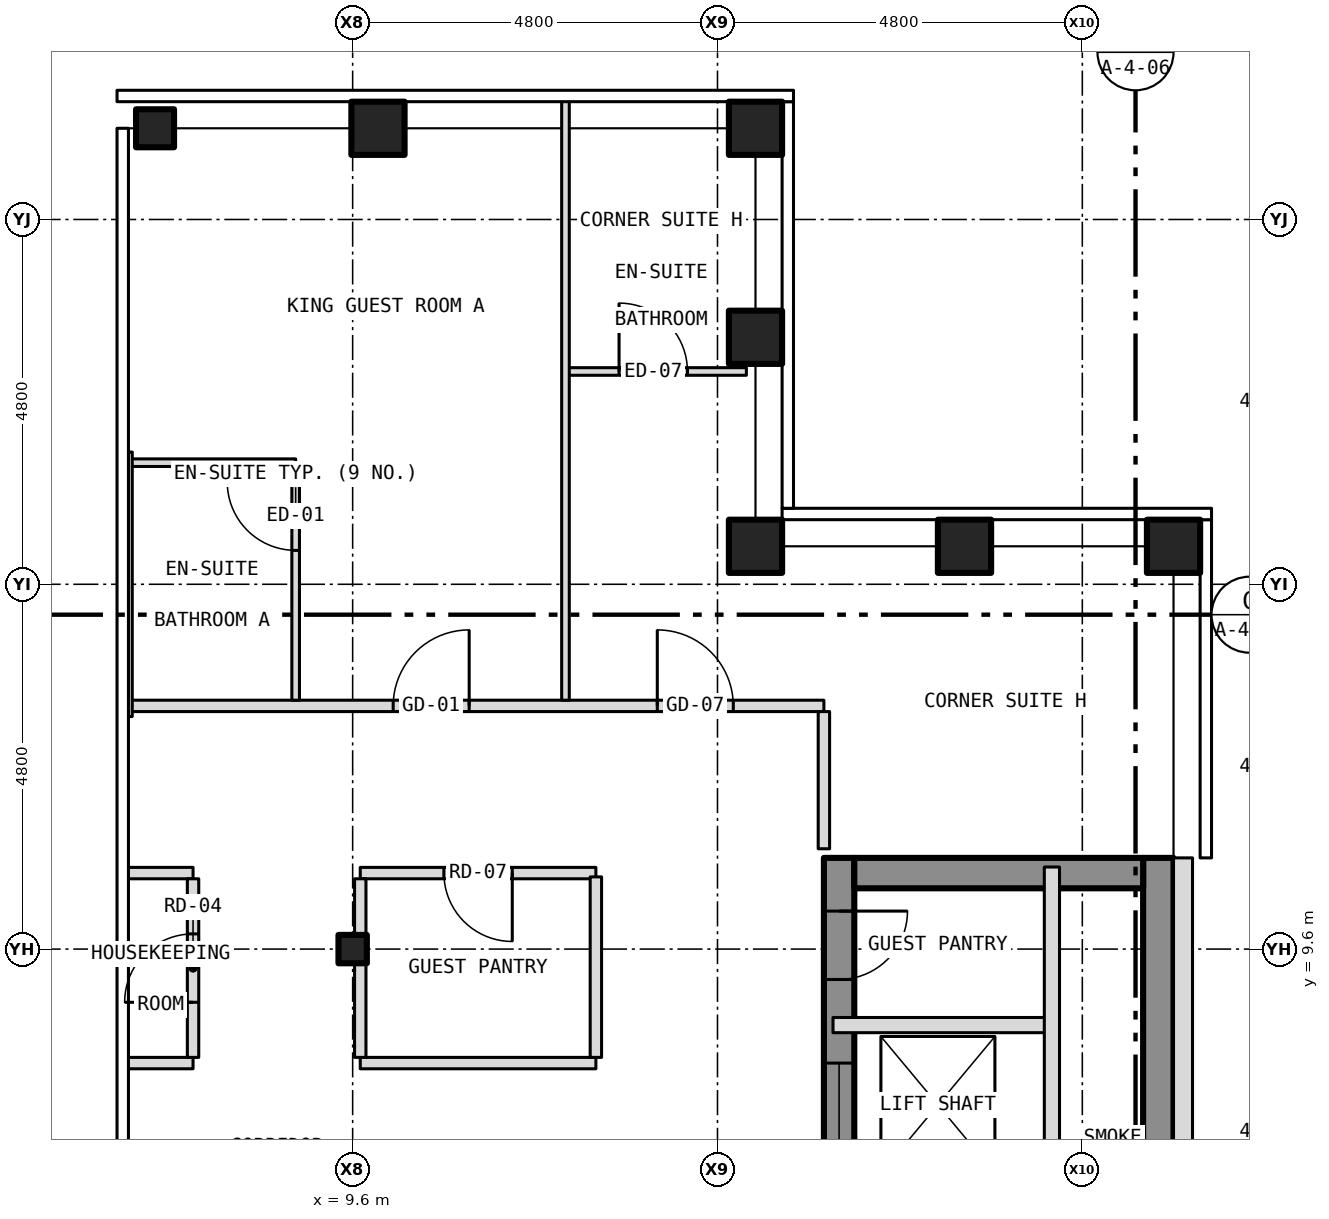
"""IFC4 building model, lengths in metres.
Left out: names, types, materials, properties, quantities, classifications, styles, units other than length and angle.
Written with IfcOpenShell. Run it as: python <this file> out.ifc"""

import sys

from ifc_helpers import new_model, si_unit, direction, frame, frame_2d, origin, origin_2d, place, context, subcontext, project, spatial, rectangle, hollow_rectangle, i_section, extrude, element, fill, save


model = new_model("IFC4")
c1 = context("Model", 3, precision=1e-05, world=origin(), true_north=direction((0.0, 1.0)))
c2 = subcontext(c1, "Body", "Model", "MODEL_VIEW")
j1 = project(units=[si_unit("LENGTHUNIT", "METRE"), si_unit("PLANEANGLEUNIT", "RADIAN")], contexts=[c1])
p1 = place(None, origin())
s1 = spatial("IfcSite", under=j1, at=p1, CompositionType="ELEMENT")
p2 = place(p1, origin())
s2 = spatial("IfcBuilding", under=s1, at=p2, CompositionType="ELEMENT")
p3 = place(p2, frame((0.0, 0.0, 229.5)))
s3 = spatial("IfcBuildingStorey", under=s2, at=p3, CompositionType="ELEMENT", Elevation=229.5)
for number, where, z_axis, x_axis in (
    (1, (9.933, 20.4, -0.15), (0.0, 0.0, 1.0), (1.0, 0.0, 0.0)),
    (2, (14.9, 20.4, -0.15), (0.0, 0.0, 1.0), (1.0, 0.0, 0.0)),
    (3, (20.4, 14.9, -0.15), (0.0, 0.0, 1.0), (1.0, 0.0, 0.0)),
    (4, (14.9, 14.9, -0.15), (0.0, 0.0, 1.0), (1.0, 0.0, 0.0)),
    (5, (14.9, 17.65, -0.15), (0.0, 0.0, 1.0), (1.0, 0.0, 0.0)),
    (6, (17.65, 14.9, -0.15), (0.0, 0.0, 1.0), (1.0, 0.0, 0.0)),
):
    element("IfcColumn", number, at=place(p3, frame(where, z_axis=z_axis, x_axis=x_axis)), inside=s3, PredefinedType="COLUMN", context=c2, shape_type="SweptSolid", body=[
        extrude(hollow_rectangle(XDim=0.7, YDim=0.7, WallThickness=0.04, at=origin_2d()), origin(), (0.0, 0.0, 1.0), 3.5),
    ])
p4 = place(p3, frame((7.0, 20.4, -0.15), z_axis=(0.0, 0.0, 1.0), x_axis=(1.0, 0.0, 0.0)))
e7 = element("IfcColumn", 7, at=p4, inside=s3, PredefinedType="COLUMN", context=c2, shape_type="SweptSolid", body=[
    extrude(hollow_rectangle(XDim=0.5, YDim=0.5, WallThickness=0.03, at=origin_2d()), origin(), (0.0, 0.0, 1.0), 3.5),
])
p5 = place(p3, frame((9.6, 9.6, -0.15), z_axis=(0.0, 0.0, 1.0), x_axis=(1.0, 0.0, 0.0)))
e8 = element("IfcColumn", 8, at=p5, inside=s3, PredefinedType="COLUMN", context=c2, shape_type="SweptSolid", body=[
    extrude(i_section(OverallWidth=0.373, OverallDepth=0.373, WebThickness=0.016, FlangeThickness=0.026, at=origin_2d()), origin(), (0.0, 0.0, 1.0), 3.5),
])
p6 = place(p3, frame((16.0, -10.8, 0.0), z_axis=(0.0, 0.0, 1.0), x_axis=(0.0, 1.0, 0.0)))
e9 = element("IfcWall", 9, at=p6, inside=s3, PredefinedType="SHEAR", context=c2, shape_type="SweptSolid", body=[
    extrude(rectangle(XDim=21.6, YDim=0.4, at=frame_2d((10.8, 0.0))), origin(), (0.0, 0.0, 1.0), 3.25),
])
p7 = place(p6, frame((9.4, 0.0, 0.0)))
e10 = element("IfcOpeningElement", 10, at=p7, cuts=e9, PredefinedType="OPENING", context=c2, shape_type="SweptSolid", body=[
    extrude(rectangle(XDim=1.1, YDim=2.1, at=frame_2d((0.55, 1.05))), frame((0.0, 0.212, 0.0), z_axis=(0.0, -1.0, 0.0), x_axis=(1.0, 0.0, 0.0)), (0.0, 0.0, 1.0), 0.424),
])
p8 = place(p6, frame((11.5, 0.0, 0.0)))
e11 = element("IfcOpeningElement", 11, at=p8, cuts=e9, PredefinedType="OPENING", context=c2, shape_type="SweptSolid", body=[
    extrude(rectangle(XDim=1.1, YDim=2.1, at=frame_2d((0.55, 1.05))), frame((0.0, 0.212, 0.0), z_axis=(0.0, -1.0, 0.0), x_axis=(1.0, 0.0, 0.0)), (0.0, 0.0, 1.0), 0.424),
])
p9 = place(p6, frame((13.6, 0.0, 0.0)))
e12 = element("IfcOpeningElement", 12, at=p9, cuts=e9, PredefinedType="OPENING", context=c2, shape_type="SweptSolid", body=[
    extrude(rectangle(XDim=1.1, YDim=2.1, at=frame_2d((0.55, 1.05))), frame((0.0, 0.212, 0.0), z_axis=(0.0, -1.0, 0.0), x_axis=(1.0, 0.0, 0.0)), (0.0, 0.0, 1.0), 0.424),
])
p10 = place(p6, frame((15.7, 0.0, 0.0)))
e13 = element("IfcOpeningElement", 13, at=p10, cuts=e9, PredefinedType="OPENING", context=c2, shape_type="SweptSolid", body=[
    extrude(rectangle(XDim=1.1, YDim=2.1, at=frame_2d((0.55, 1.05))), frame((0.0, 0.212, 0.0), z_axis=(0.0, -1.0, 0.0), x_axis=(1.0, 0.0, 0.0)), (0.0, 0.0, 1.0), 0.424),
])
p11 = place(p6, frame((17.8, 0.0, 0.0)))
e14 = element("IfcOpeningElement", 14, at=p11, cuts=e9, PredefinedType="OPENING", context=c2, shape_type="SweptSolid", body=[
    extrude(rectangle(XDim=1.1, YDim=2.1, at=frame_2d((0.55, 1.05))), frame((0.0, 0.212, 0.0), z_axis=(0.0, -1.0, 0.0), x_axis=(1.0, 0.0, 0.0)), (0.0, 0.0, 1.0), 0.424),
])
p12 = place(p6, frame((5.642, 0.0, 0.0)))
e15 = element("IfcOpeningElement", 15, at=p12, cuts=e9, PredefinedType="OPENING", context=c2, shape_type="SweptSolid", body=[
    extrude(rectangle(XDim=1.1, YDim=2.1, at=frame_2d((0.55, 1.05))), frame((0.0, 0.212, 0.0), z_axis=(0.0, -1.0, 0.0), x_axis=(1.0, 0.0, 0.0)), (0.0, 0.0, 1.0), 0.424),
])
p13 = place(p6, frame((7.5, 0.0, 0.0)))
e16 = element("IfcOpeningElement", 16, at=p13, cuts=e9, PredefinedType="OPENING", context=c2, shape_type="SweptSolid", body=[
    extrude(rectangle(XDim=1.1, YDim=2.1, at=frame_2d((0.55, 1.05))), frame((0.0, 0.212, 0.0), z_axis=(0.0, -1.0, 0.0), x_axis=(1.0, 0.0, 0.0)), (0.0, 0.0, 1.0), 0.424),
])
p14 = place(p6, frame((20.0, 0.0, 0.0)))
e17 = element("IfcOpeningElement", 17, at=p14, cuts=e9, PredefinedType="OPENING", context=c2, shape_type="SweptSolid", body=[
    extrude(rectangle(XDim=0.9, YDim=2.1, at=frame_2d((0.45, 1.05))), frame((0.0, 0.212, 0.0), z_axis=(0.0, -1.0, 0.0), x_axis=(1.0, 0.0, 0.0)), (0.0, 0.0, 1.0), 0.424),
])
p15 = place(p3, frame((20.2, -10.8, 0.0), z_axis=(0.0, 0.0, 1.0), x_axis=(0.0, 1.0, 0.0)))
e18 = element("IfcWall", 18, at=p15, inside=s3, PredefinedType="SHEAR", context=c2, shape_type="SweptSolid", body=[
    extrude(rectangle(XDim=21.6, YDim=0.4, at=frame_2d((10.8, 0.0))), origin(), (0.0, 0.0, 1.0), 3.25),
])
p16 = place(p3, frame((16.2, 10.6, 0.0), z_axis=(0.0, 0.0, 1.0), x_axis=(1.0, 0.0, 0.0)))
e19 = element("IfcWall", 19, at=p16, inside=s3, PredefinedType="SHEAR", context=c2, shape_type="SweptSolid", body=[
    extrude(rectangle(XDim=3.8, YDim=0.4, at=frame_2d((1.9, 0.0))), origin(), (0.0, 0.0, 1.0), 3.25),
])
p17 = place(p3, frame((20.525, -10.8, 0.0), z_axis=(0.0, 0.0, 1.0), x_axis=(0.0, 1.0, 0.0)))
e20 = element("IfcWall", 20, at=p17, inside=s3, PredefinedType="SOLIDWALL", context=c2, shape_type="SweptSolid", body=[
    extrude(rectangle(XDim=21.6, YDim=0.25, at=frame_2d((10.8, 0.0))), origin(), (0.0, 0.0, 1.0), 3.5),
])
p18 = place(p17, frame((2.95, 0.0, 1.0)))
e21 = element("IfcOpeningElement", 21, at=p18, cuts=e20, PredefinedType="OPENING", context=c2, shape_type="SweptSolid", body=[
    extrude(rectangle(XDim=0.6, YDim=1.5, at=frame_2d((0.3, 0.75))), frame((0.0, 0.137, 0.0), z_axis=(0.0, -1.0, 0.0), x_axis=(1.0, 0.0, 0.0)), (0.0, 0.0, 1.0), 0.274),
])
p19 = place(p3, frame((6.62, 8.1, 0.0), z_axis=(0.0, 0.0, 1.0), x_axis=(1.0, 0.0, 0.0)))
e22 = element("IfcWall", 22, at=p19, inside=s3, PredefinedType="PARTITIONING", context=c2, shape_type="SweptSolid", body=[
    extrude(rectangle(XDim=0.88, YDim=0.15, at=frame_2d((0.44, 0.0))), origin(), (0.0, 0.0, 1.0), 3.35),
])
p20 = place(p3, frame((9.7, 8.1, 0.0), z_axis=(0.0, 0.0, 1.0), x_axis=(1.0, 0.0, 0.0)))
e23 = element("IfcWall", 23, at=p20, inside=s3, PredefinedType="PARTITIONING", context=c2, shape_type="SweptSolid", body=[
    extrude(rectangle(XDim=3.1, YDim=0.15, at=frame_2d((1.55, 0.0))), origin(), (0.0, 0.0, 1.0), 3.35),
])
p21 = place(p3, frame((15.92, 8.6, 0.0), z_axis=(0.0, 0.0, 1.0), x_axis=(1.0, 0.0, 0.0)))
e24 = element("IfcWall", 24, at=p21, inside=s3, PredefinedType="PARTITIONING", context=c2, shape_type="SweptSolid", body=[
    extrude(rectangle(XDim=2.88, YDim=0.2, at=frame_2d((1.44, 0.0))), origin(), (0.0, 0.0, 1.0), 3.25),
])
p22 = place(p3, frame((6.62, 10.6, 0.0), z_axis=(0.0, 0.0, 1.0), x_axis=(1.0, 0.0, 0.0)))
e25 = element("IfcWall", 25, at=p22, inside=s3, PredefinedType="PARTITIONING", context=c2, shape_type="SweptSolid", body=[
    extrude(rectangle(XDim=0.88, YDim=0.15, at=frame_2d((0.44, 0.0))), origin(), (0.0, 0.0, 1.0), 3.35),
])
p23 = place(p3, frame((9.7, 10.6, 0.0), z_axis=(0.0, 0.0, 1.0), x_axis=(1.0, 0.0, 0.0)))
e26 = element("IfcWall", 26, at=p23, inside=s3, PredefinedType="PARTITIONING", context=c2, shape_type="SweptSolid", body=[
    extrude(rectangle(XDim=3.1, YDim=0.15, at=frame_2d((1.55, 0.0))), origin(), (0.0, 0.0, 1.0), 3.35),
])
p24 = place(p23, frame((1.1, 0.0, 0.0)))
e27 = element("IfcOpeningElement", 27, at=p24, cuts=e26, PredefinedType="OPENING", context=c2, shape_type="SweptSolid", body=[
    extrude(rectangle(XDim=0.9, YDim=2.1, at=frame_2d((0.45, 1.05))), frame((0.0, 0.087, 0.0), z_axis=(0.0, -1.0, 0.0), x_axis=(1.0, 0.0, 0.0)), (0.0, 0.0, 1.0), 0.174),
])
p25 = place(p3, frame((6.65, 12.8, 0.0), z_axis=(0.0, 0.0, 1.0), x_axis=(1.0, 0.0, 0.0)))
e28 = element("IfcWall", 28, at=p25, inside=s3, PredefinedType="PARTITIONING", context=c2, shape_type="SweptSolid", body=[
    extrude(rectangle(XDim=9.15, YDim=0.15, at=frame_2d((4.575, 0.0))), origin(), (0.0, 0.0, 1.0), 3.35),
])
p26 = place(p25, frame((3.483, 0.0, 0.0)))
e29 = element("IfcOpeningElement", 29, at=p26, cuts=e28, PredefinedType="OPENING", context=c2, shape_type="SweptSolid", body=[
    extrude(rectangle(XDim=1.0, YDim=2.1, at=frame_2d((0.5, 1.05))), frame((0.0, 0.087, 0.0), z_axis=(0.0, -1.0, 0.0), x_axis=(1.0, 0.0, 0.0)), (0.0, 0.0, 1.0), 0.174),
])
p27 = place(p25, frame((6.958, 0.0, 0.0)))
e30 = element("IfcOpeningElement", 30, at=p27, cuts=e28, PredefinedType="OPENING", context=c2, shape_type="SweptSolid", body=[
    extrude(rectangle(XDim=1.0, YDim=2.1, at=frame_2d((0.5, 1.05))), frame((0.0, 0.087, 0.0), z_axis=(0.0, -1.0, 0.0), x_axis=(1.0, 0.0, 0.0)), (0.0, 0.0, 1.0), 0.174),
])
p28 = place(p3, frame((6.65, 16.0, 0.0), z_axis=(0.0, 0.0, 1.0), x_axis=(1.0, 0.0, 0.0)))
e31 = element("IfcWall", 31, at=p28, inside=s3, PredefinedType="PARTITIONING", context=c2, shape_type="SweptSolid", body=[
    extrude(rectangle(XDim=2.2, YDim=0.1, at=frame_2d((1.1, 0.0))), origin(), (0.0, 0.0, 1.0), 3.35),
])
p29 = place(p3, frame((12.4, 17.2, 0.0), z_axis=(0.0, 0.0, 1.0), x_axis=(1.0, 0.0, 0.0)))
e32 = element("IfcWall", 32, at=p29, inside=s3, PredefinedType="PARTITIONING", context=c2, shape_type="SweptSolid", body=[
    extrude(rectangle(XDim=2.38, YDim=0.1, at=frame_2d((1.19, 0.0))), origin(), (0.0, 0.0, 1.0), 3.35),
])
p30 = place(p29, frame((0.705, 0.0, 0.0)))
e33 = element("IfcOpeningElement", 33, at=p30, cuts=e32, PredefinedType="OPENING", context=c2, shape_type="SweptSolid", body=[
    extrude(rectangle(XDim=0.9, YDim=2.1, at=frame_2d((0.45, 1.05))), frame((0.0, 0.062, 0.0), z_axis=(0.0, -1.0, 0.0), x_axis=(1.0, 0.0, 0.0)), (0.0, 0.0, 1.0), 0.124),
])
p31 = place(p3, frame((6.65, 12.66, 0.0), z_axis=(0.0, 0.0, 1.0), x_axis=(0.0, 1.0, 0.0)))
e34 = element("IfcWall", 34, at=p31, inside=s3, PredefinedType="PARTITIONING", context=c2, shape_type="SweptSolid", body=[
    extrude(rectangle(XDim=3.48, YDim=0.1, at=frame_2d((1.74, 0.0))), origin(), (0.0, 0.0, 1.0), 3.35),
])
p32 = place(p3, frame((7.5, 8.175, 0.0), z_axis=(0.0, 0.0, 1.0), x_axis=(0.0, 1.0, 0.0)))
e35 = element("IfcWall", 35, at=p32, inside=s3, PredefinedType="PARTITIONING", context=c2, shape_type="SweptSolid", body=[
    extrude(rectangle(XDim=2.35, YDim=0.15, at=frame_2d((1.175, 0.0))), origin(), (0.0, 0.0, 1.0), 3.35),
])
p33 = place(p32, frame((0.725, 0.0, 0.0)))
e36 = element("IfcOpeningElement", 36, at=p33, cuts=e35, PredefinedType="OPENING", context=c2, shape_type="SweptSolid", body=[
    extrude(rectangle(XDim=0.9, YDim=2.1, at=frame_2d((0.45, 1.05))), frame((0.0, 0.087, 0.0), z_axis=(0.0, -1.0, 0.0), x_axis=(1.0, 0.0, 0.0)), (0.0, 0.0, 1.0), 0.174),
])
p34 = place(p3, frame((8.85, 12.875, 0.0), z_axis=(0.0, 0.0, 1.0), x_axis=(0.0, 1.0, 0.0)))
e37 = element("IfcWall", 37, at=p34, inside=s3, PredefinedType="PARTITIONING", context=c2, shape_type="SweptSolid", body=[
    extrude(rectangle(XDim=3.075, YDim=0.1, at=frame_2d((1.538, 0.0))), origin(), (0.0, 0.0, 1.0), 3.35),
])
p35 = place(p34, frame((1.971, 0.0, 0.0)))
e38 = element("IfcOpeningElement", 38, at=p35, cuts=e37, PredefinedType="OPENING", context=c2, shape_type="SweptSolid", body=[
    extrude(rectangle(XDim=0.9, YDim=2.1, at=frame_2d((0.45, 1.05))), frame((0.0, 0.062, 0.0), z_axis=(0.0, -1.0, 0.0), x_axis=(1.0, 0.0, 0.0)), (0.0, 0.0, 1.0), 0.124),
])
p36 = place(p3, frame((9.7, 8.175, 0.0), z_axis=(0.0, 0.0, 1.0), x_axis=(0.0, 1.0, 0.0)))
e39 = element("IfcWall", 39, at=p36, inside=s3, PredefinedType="PARTITIONING", context=c2, shape_type="SweptSolid", body=[
    extrude(rectangle(XDim=1.238, YDim=0.15, at=frame_2d((0.619, 0.0))), origin(), (0.0, 0.0, 1.0), 2.728),
])
p37 = place(p3, frame((9.7, 9.413, 0.0), z_axis=(0.0, 0.0, 1.0), x_axis=(0.0, 1.0, 0.0)))
e40 = element("IfcWall", 40, at=p37, inside=s3, PredefinedType="PARTITIONING", context=c2, shape_type="SweptSolid", body=[
    extrude(rectangle(XDim=0.374, YDim=0.15, at=frame_2d((0.187, 0.0))), origin(), (0.0, 0.0, 1.0), 3.35),
])
p38 = place(p3, frame((9.7, 9.787, 0.0), z_axis=(0.0, 0.0, 1.0), x_axis=(0.0, 1.0, 0.0)))
e41 = element("IfcWall", 41, at=p38, inside=s3, PredefinedType="PARTITIONING", context=c2, shape_type="SweptSolid", body=[
    extrude(rectangle(XDim=0.738, YDim=0.15, at=frame_2d((0.369, 0.0))), origin(), (0.0, 0.0, 1.0), 2.728),
])
p39 = place(p3, frame((12.4, 12.875, 0.0), z_axis=(0.0, 0.0, 1.0), x_axis=(0.0, 1.0, 0.0)))
e42 = element("IfcWall", 42, at=p39, inside=s3, PredefinedType="PARTITIONING", context=c2, shape_type="SweptSolid", body=[
    extrude(rectangle(XDim=7.905, YDim=0.1, at=frame_2d((3.953, 0.0))), origin(), (0.0, 0.0, 1.0), 3.35),
])
p40 = place(p3, frame((12.8, 8.175, 0.0), z_axis=(0.0, 0.0, 1.0), x_axis=(0.0, 1.0, 0.0)))
e43 = element("IfcWall", 43, at=p40, inside=s3, PredefinedType="PARTITIONING", context=c2, shape_type="SweptSolid", body=[
    extrude(rectangle(XDim=2.375, YDim=0.15, at=frame_2d((1.188, 0.0))), origin(), (0.0, 0.0, 1.0), 3.35),
])
p41 = place(p3, frame((15.8, 10.92, 0.0), z_axis=(0.0, 0.0, 1.0), x_axis=(0.0, 1.0, 0.0)))
e44 = element("IfcWall", 44, at=p41, inside=s3, PredefinedType="PARTITIONING", context=c2, shape_type="SweptSolid", body=[
    extrude(rectangle(XDim=1.805, YDim=0.15, at=frame_2d((0.903, 0.0))), origin(), (0.0, 0.0, 1.0), 3.35),
])
p42 = place(p3, frame((18.8, -1.8, 0.0), z_axis=(0.0, 0.0, 1.0), x_axis=(0.0, 1.0, 0.0)))
e45 = element("IfcWall", 45, at=p42, inside=s3, PredefinedType="PARTITIONING", context=c2, shape_type="SweptSolid", body=[
    extrude(rectangle(XDim=12.48, YDim=0.2, at=frame_2d((6.24, 0.0))), origin(), (0.0, 0.0, 1.0), 3.25),
])
p43 = place(p11, origin())
e46 = element("IfcDoor", 46, at=p43, inside=s3, OperationType="SLIDING_TO_LEFT", PredefinedType="DOOR", context=c2, shape_type="SweptSolid", body=[
    extrude(rectangle(XDim=1.1, YDim=2.1, at=frame_2d((0.55, 1.05))), frame((0.0, 0.025, 0.0), z_axis=(0.0, -1.0, 0.0), x_axis=(1.0, 0.0, 0.0)), (0.0, 0.0, 1.0), 0.05),
])
fill(e14, e46)
p44 = place(p14, origin())
e47 = element("IfcDoor", 47, at=p44, inside=s3, OperationType="SINGLE_SWING_RIGHT", PredefinedType="DOOR", context=c2, shape_type="SweptSolid", body=[
    extrude(rectangle(XDim=0.9, YDim=2.1, at=frame_2d((0.45, 1.05))), frame((0.0, 0.025, 0.0), z_axis=(0.0, -1.0, 0.0), x_axis=(1.0, 0.0, 0.0)), (0.0, 0.0, 1.0), 0.05),
])
fill(e17, e47)
p45 = place(p26, origin())
e48 = element("IfcDoor", 48, at=p45, inside=s3, OperationType="SINGLE_SWING_RIGHT", PredefinedType="DOOR", context=c2, shape_type="SweptSolid", body=[
    extrude(rectangle(XDim=1.0, YDim=2.1, at=frame_2d((0.5, 1.05))), frame((0.0, 0.025, 0.0), z_axis=(0.0, -1.0, 0.0), x_axis=(1.0, 0.0, 0.0)), (0.0, 0.0, 1.0), 0.05),
])
fill(e29, e48)
p46 = place(p35, origin())
e49 = element("IfcDoor", 49, at=p46, inside=s3, OperationType="SINGLE_SWING_RIGHT", PredefinedType="DOOR", context=c2, shape_type="SweptSolid", body=[
    extrude(rectangle(XDim=0.9, YDim=2.1, at=frame_2d((0.45, 1.05))), frame((0.0, 0.025, 0.0), z_axis=(0.0, -1.0, 0.0), x_axis=(1.0, 0.0, 0.0)), (0.0, 0.0, 1.0), 0.05),
])
fill(e38, e49)
p47 = place(p30, origin())
e50 = element("IfcDoor", 50, at=p47, inside=s3, OperationType="SINGLE_SWING_LEFT", PredefinedType="DOOR", context=c2, shape_type="SweptSolid", body=[
    extrude(rectangle(XDim=0.9, YDim=2.1, at=frame_2d((0.45, 1.05))), frame((0.0, 0.025, 0.0), z_axis=(0.0, -1.0, 0.0), x_axis=(1.0, 0.0, 0.0)), (0.0, 0.0, 1.0), 0.05),
])
fill(e33, e50)
p48 = place(p27, origin())
e51 = element("IfcDoor", 51, at=p48, inside=s3, OperationType="SINGLE_SWING_LEFT", PredefinedType="DOOR", context=c2, shape_type="SweptSolid", body=[
    extrude(rectangle(XDim=1.0, YDim=2.1, at=frame_2d((0.5, 1.05))), frame((0.0, 0.025, 0.0), z_axis=(0.0, -1.0, 0.0), x_axis=(1.0, 0.0, 0.0)), (0.0, 0.0, 1.0), 0.05),
])
fill(e30, e51)
p49 = place(p33, origin())
e52 = element("IfcDoor", 52, at=p49, inside=s3, OperationType="SINGLE_SWING_LEFT", PredefinedType="DOOR", context=c2, shape_type="SweptSolid", body=[
    extrude(rectangle(XDim=0.9, YDim=2.1, at=frame_2d((0.45, 1.05))), frame((0.0, 0.025, 0.0), z_axis=(0.0, -1.0, 0.0), x_axis=(1.0, 0.0, 0.0)), (0.0, 0.0, 1.0), 0.05),
])
fill(e36, e52)
p50 = place(p24, origin())
e53 = element("IfcDoor", 53, at=p50, inside=s3, OperationType="SINGLE_SWING_RIGHT", PredefinedType="DOOR", context=c2, shape_type="SweptSolid", body=[
    extrude(rectangle(XDim=0.9, YDim=2.1, at=frame_2d((0.45, 1.05))), frame((0.0, 0.025, 0.0), z_axis=(0.0, -1.0, 0.0), x_axis=(1.0, 0.0, 0.0)), (0.0, 0.0, 1.0), 0.05),
])
fill(e27, e53)
save(model, sys.argv[1])
